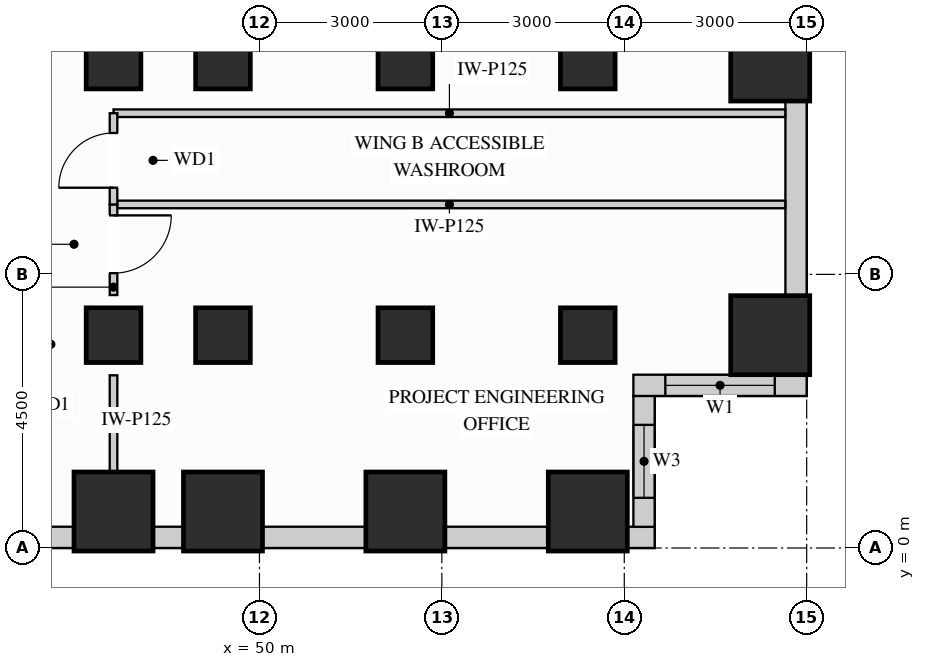
"""IFC4 building model, lengths in metres.
Left out: names, types, materials, properties, quantities, classifications, styles, units other than length and angle.
Written with IfcOpenShell. Run it as: python <this file> out.ifc"""

import sys

from ifc_helpers import new_model, si_unit, direction, frame, frame_2d, origin, origin_2d, place, context, subcontext, project, spatial, rectangle, extrude, source, transform, mapped, element, fill, save


model = new_model("IFC4")
c1 = context("Model", 3, precision=1e-05, world=origin(), true_north=direction((0.0, 1.0)))
c2 = subcontext(c1, "Body", "Model", "MODEL_VIEW")
j1 = project(units=[si_unit("LENGTHUNIT", "METRE"), si_unit("PLANEANGLEUNIT", "RADIAN")], contexts=[c1])
p1 = place(None, origin())
s1 = spatial("IfcSite", under=j1, at=p1, CompositionType="ELEMENT")
p2 = place(p1, origin())
s2 = spatial("IfcBuilding", under=s1, at=p2, CompositionType="ELEMENT")
p3 = place(p2, frame((0.0, 0.0, 44.1)))
s3 = spatial("IfcBuildingStorey", under=s2, at=p3, CompositionType="ELEMENT", Elevation=44.1)
m1 = source(origin(), c2, "Body", "SweptSolid", [
    extrude(rectangle(XDim=0.9, YDim=0.9, at=origin_2d()), origin(), (0.0, 0.0, 1.0), 3.38),
])
for number, where, z_axis, x_axis in (
    (1, (47.6, 3.5, 0.0), (0.0, 0.0, 1.0), (1.0, 0.0, 0.0)),
    (2, (47.6, 8.0, 0.0), (0.0, 0.0, 1.0), (1.0, 0.0, 0.0)),
    (3, (49.4, 3.5, 0.0), (0.0, 0.0, 1.0), (1.0, 0.0, 0.0)),
    (4, (49.4, 8.0, 0.0), (0.0, 0.0, 1.0), (1.0, 0.0, 0.0)),
    (5, (52.4, 3.5, 0.0), (0.0, 0.0, 1.0), (1.0, 0.0, 0.0)),
    (6, (52.4, 8.0, 0.0), (0.0, 0.0, 1.0), (1.0, 0.0, 0.0)),
    (7, (55.4, 3.5, 0.0), (0.0, 0.0, 1.0), (1.0, 0.0, 0.0)),
    (8, (55.4, 8.0, 0.0), (0.0, 0.0, 1.0), (1.0, 0.0, 0.0)),
):
    element("IfcColumn", number, at=place(p3, frame(where, z_axis=z_axis, x_axis=x_axis)), inside=s3, PredefinedType="COLUMN", context=c2, shape_type="MappedRepresentation", body=[
        mapped(m1, transform((0.0, 0.0, 0.0), x_axis=(1.0, 0.0, 0.0), y_axis=(0.0, 1.0, 0.0), z_axis=(0.0, 0.0, 1.0))),
    ])
m2 = source(origin(), c2, "Body", "SweptSolid", [
    extrude(rectangle(XDim=1.3, YDim=1.3, at=origin_2d()), origin(), (0.0, 0.0, 1.0), 3.38),
])
for number, where, z_axis, x_axis in (
    (9, (58.4, 3.5, 0.0), (0.0, 0.0, 1.0), (1.0, 0.0, 0.0)),
    (10, (58.4, 8.0, 0.0), (0.0, 0.0, 1.0), (1.0, 0.0, 0.0)),
    (11, (47.6, 0.6, 0.0), (0.0, 0.0, 1.0), (1.0, 0.0, 0.0)),
    (12, (49.4, 0.6, 0.0), (0.0, 0.0, 1.0), (1.0, 0.0, 0.0)),
    (13, (52.4, 0.6, 0.0), (0.0, 0.0, 1.0), (1.0, 0.0, 0.0)),
    (14, (55.4, 0.6, 0.0), (0.0, 0.0, 1.0), (1.0, 0.0, 0.0)),
):
    element("IfcColumn", number, at=place(p3, frame(where, z_axis=z_axis, x_axis=x_axis)), inside=s3, PredefinedType="COLUMN", context=c2, shape_type="MappedRepresentation", body=[
        mapped(m2, transform((0.0, 0.0, 0.0), x_axis=(1.0, 0.0, 0.0), y_axis=(0.0, 1.0, 0.0), z_axis=(0.0, 0.0, 1.0))),
    ])
p4 = place(p3, frame((40.648, 0.175, 0.0), z_axis=(0.0, 0.0, 1.0), x_axis=(1.0, 0.0, 0.0)))
e15 = element("IfcWall", 15, at=p4, inside=s3, PredefinedType="SOLIDWALL", context=c2, shape_type="SweptSolid", body=[
    extrude(rectangle(XDim=6.304, YDim=0.35, at=frame_2d((3.152, 0.0))), origin(), (0.0, 0.0, 1.0), 2.428),
])
p5 = place(p4, frame((0.687, 0.0, 0.78)))
e16 = element("IfcOpeningElement", 16, at=p5, cuts=e15, PredefinedType="OPENING", context=c2, shape_type="SweptSolid", body=[
    extrude(rectangle(XDim=1.8, YDim=1.468, at=frame_2d((0.9, 0.734))), frame((0.0, 0.185, 0.0), z_axis=(0.0, -1.0, 0.0), x_axis=(1.0, 0.0, 0.0)), (0.0, 0.0, 1.0), 0.37),
])
p6 = place(p4, frame((2.855, 0.0, 0.78)))
e17 = element("IfcOpeningElement", 17, at=p6, cuts=e15, PredefinedType="OPENING", context=c2, shape_type="SweptSolid", body=[
    extrude(rectangle(XDim=1.8, YDim=1.468, at=frame_2d((0.9, 0.734))), frame((0.0, 0.185, 0.0), z_axis=(0.0, -1.0, 0.0), x_axis=(1.0, 0.0, 0.0)), (0.0, 0.0, 1.0), 0.37),
])
m3 = source(origin(), c2, "Body", "SweptSolid", [
    extrude(rectangle(XDim=0.504, YDim=0.35, at=frame_2d((0.252, 0.0))), origin(), (0.0, 0.0, 1.0), 3.365),
])
p7 = place(p3, frame((48.248, 0.175, 0.0), z_axis=(0.0, 0.0, 1.0), x_axis=(1.0, 0.0, 0.0)))
e18 = element("IfcWall", 18, at=p7, inside=s3, PredefinedType="SOLIDWALL", context=c2, shape_type="MappedRepresentation", body=[
    mapped(m3, transform((0.0, 0.0, 0.0), x_axis=(1.0, 0.0, 0.0), y_axis=(0.0, 1.0, 0.0), z_axis=(0.0, 0.0, 1.0))),
])
m4 = source(origin(), c2, "Body", "SweptSolid", [
    extrude(rectangle(XDim=1.704, YDim=0.35, at=frame_2d((0.852, 0.0))), origin(), (0.0, 0.0, 1.0), 2.51),
])
for number, where, z_axis, x_axis in (
    (19, (50.048, 0.175, 0.0), (0.0, 0.0, 1.0), (1.0, 0.0, 0.0)),
    (20, (53.048, 0.175, 0.0), (0.0, 0.0, 1.0), (1.0, 0.0, 0.0)),
):
    element("IfcWall", number, at=place(p3, frame(where, z_axis=z_axis, x_axis=x_axis)), inside=s3, PredefinedType="SOLIDWALL", context=c2, shape_type="MappedRepresentation", body=[
        mapped(m4, transform((0.0, 0.0, 0.0), x_axis=(1.0, 0.0, 0.0), y_axis=(0.0, 1.0, 0.0), z_axis=(0.0, 0.0, 1.0))),
    ])
m5 = source(origin(), c2, "Body", "SweptSolid", [
    extrude(rectangle(XDim=0.452, YDim=0.35, at=frame_2d((0.226, 0.0))), origin(), (0.0, 0.0, 1.0), 3.365),
])
p8 = place(p3, frame((56.048, 0.175, 0.0), z_axis=(0.0, 0.0, 1.0), x_axis=(1.0, 0.0, 0.0)))
e21 = element("IfcWall", 21, at=p8, inside=s3, PredefinedType="SOLIDWALL", context=c2, shape_type="MappedRepresentation", body=[
    mapped(m5, transform((0.0, 0.0, 0.0), x_axis=(1.0, 0.0, 0.0), y_axis=(0.0, 1.0, 0.0), z_axis=(0.0, 0.0, 1.0))),
])
p9 = place(p3, frame((56.325, 0.348, 0.0), z_axis=(0.0, 0.0, 1.0), x_axis=(0.0, 1.0, 0.0)))
e22 = element("IfcWall", 22, at=p9, inside=s3, PredefinedType="SOLIDWALL", context=c2, shape_type="SweptSolid", body=[
    extrude(rectangle(XDim=2.154, YDim=0.35, at=frame_2d((1.077, 0.0))), origin(), (0.0, 0.0, 1.0), 3.365),
])
p10 = place(p9, frame((0.477, 0.0, 0.78)))
e23 = element("IfcOpeningElement", 23, at=p10, cuts=e22, PredefinedType="OPENING", context=c2, shape_type="SweptSolid", body=[
    extrude(rectangle(XDim=1.2, YDim=2.1, at=frame_2d((0.6, 1.05))), frame((0.0, 0.185, 0.0), z_axis=(0.0, -1.0, 0.0), x_axis=(1.0, 0.0, 0.0)), (0.0, 0.0, 1.0), 0.37),
])
p11 = place(p3, frame((56.15, 2.675, 0.0), z_axis=(0.0, 0.0, 1.0), x_axis=(1.0, 0.0, 0.0)))
e24 = element("IfcWall", 24, at=p11, inside=s3, PredefinedType="SOLIDWALL", context=c2, shape_type="SweptSolid", body=[
    extrude(rectangle(XDim=2.85, YDim=0.35, at=frame_2d((1.425, 0.0))), origin(), (0.0, 0.0, 1.0), 3.365),
])
p12 = place(p11, frame((0.525, 0.0, 0.78)))
e25 = element("IfcOpeningElement", 25, at=p12, cuts=e24, PredefinedType="OPENING", context=c2, shape_type="SweptSolid", body=[
    extrude(rectangle(XDim=1.8, YDim=2.1, at=frame_2d((0.9, 1.05))), frame((0.0, 0.185, 0.0), z_axis=(0.0, -1.0, 0.0), x_axis=(1.0, 0.0, 0.0)), (0.0, 0.0, 1.0), 0.37),
])
m6 = source(origin(), c2, "Body", "SweptSolid", [
    extrude(rectangle(XDim=3.204, YDim=0.35, at=frame_2d((1.602, 0.0))), origin(), (0.0, 0.0, 1.0), 2.51),
])
p13 = place(p3, frame((58.825, 4.148, 0.0), z_axis=(0.0, 0.0, 1.0), x_axis=(0.0, 1.0, 0.0)))
e26 = element("IfcWall", 26, at=p13, inside=s3, PredefinedType="SOLIDWALL", context=c2, shape_type="MappedRepresentation", body=[
    mapped(m6, transform((0.0, 0.0, 0.0), x_axis=(1.0, 0.0, 0.0), y_axis=(0.0, 1.0, 0.0), z_axis=(0.0, 0.0, 1.0))),
])
m7 = source(origin(), c2, "Body", "SweptSolid", [
    extrude(rectangle(XDim=11.048, YDim=0.125, at=frame_2d((5.524, 0.0))), origin(), (0.0, 0.0, 1.0), 3.365),
])
for number, where, z_axis, x_axis in (
    (27, (47.6, 5.65, 0.0), (0.0, 0.0, 1.0), (1.0, 0.0, 0.0)),
    (28, (47.6, 7.15, 0.0), (0.0, 0.0, 1.0), (1.0, 0.0, 0.0)),
):
    element("IfcWall", number, at=place(p3, frame(where, z_axis=z_axis, x_axis=x_axis)), inside=s3, PredefinedType="PARTITIONING", context=c2, shape_type="MappedRepresentation", body=[
        mapped(m7, transform((0.0, 0.0, 0.0), x_axis=(1.0, 0.0, 0.0), y_axis=(0.0, 1.0, 0.0), z_axis=(0.0, 0.0, 1.0))),
    ])
p14 = place(p3, frame((47.6, 4.16, 0.0), z_axis=(0.0, 0.0, 1.0), x_axis=(0.0, 1.0, 0.0)))
e29 = element("IfcWall", 29, at=p14, inside=s3, PredefinedType="PARTITIONING", context=c2, shape_type="SweptSolid", body=[
    extrude(rectangle(XDim=1.49, YDim=0.125, at=frame_2d((0.745, 0.0))), origin(), (0.0, 0.0, 1.0), 2.67),
])
p15 = place(p14, frame((0.36, 0.0, 0.0)))
e30 = element("IfcOpeningElement", 30, at=p15, cuts=e29, PredefinedType="OPENING", context=c2, shape_type="SweptSolid", body=[
    extrude(rectangle(XDim=0.95, YDim=2.15, at=frame_2d((0.475, 1.075))), frame((0.0, 0.073, 0.0), z_axis=(0.0, -1.0, 0.0), x_axis=(1.0, 0.0, 0.0)), (0.0, 0.0, 1.0), 0.145),
])
m8 = source(origin(), c2, "Body", "SweptSolid", [
    extrude(rectangle(XDim=1.58, YDim=0.125, at=frame_2d((0.79, 0.0))), origin(), (0.0, 0.0, 1.0), 2.67),
])
p16 = place(p3, frame((47.6, 1.26, 0.0), z_axis=(0.0, 0.0, 1.0), x_axis=(0.0, 1.0, 0.0)))
e31 = element("IfcWall", 31, at=p16, inside=s3, PredefinedType="PARTITIONING", context=c2, shape_type="MappedRepresentation", body=[
    mapped(m8, transform((0.0, 0.0, 0.0), x_axis=(1.0, 0.0, 0.0), y_axis=(0.0, 1.0, 0.0), z_axis=(0.0, 0.0, 1.0))),
])
p17 = place(p3, frame((47.6, 5.65, 0.0), z_axis=(0.0, 0.0, 1.0), x_axis=(0.0, 1.0, 0.0)))
e32 = element("IfcWall", 32, at=p17, inside=s3, PredefinedType="PARTITIONING", context=c2, shape_type="SweptSolid", body=[
    extrude(rectangle(XDim=1.5, YDim=0.125, at=frame_2d((0.75, 0.0))), origin(), (0.0, 0.0, 1.0), 2.67),
])
p18 = place(p17, frame((0.275, 0.0, 0.0)))
e33 = element("IfcOpeningElement", 33, at=p18, cuts=e32, PredefinedType="OPENING", context=c2, shape_type="SweptSolid", body=[
    extrude(rectangle(XDim=0.9, YDim=2.15, at=frame_2d((0.45, 1.075))), frame((0.0, 0.073, 0.0), z_axis=(0.0, -1.0, 0.0), x_axis=(1.0, 0.0, 0.0)), (0.0, 0.0, 1.0), 0.145),
])
m9 = source(origin(), c2, "Body", "SweptSolid", [
    extrude(rectangle(XDim=0.95, YDim=2.15, at=frame_2d((0.475, 1.075))), frame((0.0, 0.025, 0.0), z_axis=(0.0, -1.0, 0.0), x_axis=(1.0, 0.0, 0.0)), (0.0, 0.0, 1.0), 0.05),
])
p19 = place(p15, origin())
e34 = element("IfcDoor", 34, at=p19, inside=s3, OperationType="SINGLE_SWING_RIGHT", PredefinedType="DOOR", context=c2, shape_type="MappedRepresentation", body=[
    mapped(m9, transform((0.0, 0.0, 0.0), x_axis=(1.0, 0.0, 0.0), y_axis=(0.0, 1.0, 0.0), z_axis=(0.0, 0.0, 1.0))),
])
fill(e30, e34)
m10 = source(origin(), c2, "Body", "SweptSolid", [
    extrude(rectangle(XDim=0.9, YDim=2.15, at=frame_2d((0.45, 1.075))), frame((0.0, 0.025, 0.0), z_axis=(0.0, -1.0, 0.0), x_axis=(1.0, 0.0, 0.0)), (0.0, 0.0, 1.0), 0.05),
])
p20 = place(p18, origin())
e35 = element("IfcDoor", 35, at=p20, inside=s3, OperationType="SINGLE_SWING_LEFT", PredefinedType="DOOR", context=c2, shape_type="MappedRepresentation", body=[
    mapped(m10, transform((0.0, 0.0, 0.0), x_axis=(1.0, 0.0, 0.0), y_axis=(0.0, 1.0, 0.0), z_axis=(0.0, 0.0, 1.0))),
])
fill(e33, e35)
m11 = source(origin(), c2, "Body", "SweptSolid", [
    extrude(rectangle(XDim=1.8, YDim=2.1, at=frame_2d((0.9, 1.05))), frame((0.0, 0.03, 0.0), z_axis=(0.0, -1.0, 0.0), x_axis=(1.0, 0.0, 0.0)), (0.0, 0.0, 1.0), 0.06),
])
p21 = place(p12, origin())
e36 = element("IfcWindow", 36, at=p21, inside=s3, PartitioningType="SINGLE_PANEL", PredefinedType="WINDOW", context=c2, shape_type="MappedRepresentation", body=[
    mapped(m11, transform((0.0, 0.0, 0.0), x_axis=(1.0, 0.0, 0.0), y_axis=(0.0, 1.0, 0.0), z_axis=(0.0, 0.0, 1.0))),
])
fill(e25, e36)
m12 = source(origin(), c2, "Body", "SweptSolid", [
    extrude(rectangle(XDim=1.2, YDim=2.1, at=frame_2d((0.6, 1.05))), frame((0.0, 0.03, 0.0), z_axis=(0.0, -1.0, 0.0), x_axis=(1.0, 0.0, 0.0)), (0.0, 0.0, 1.0), 0.06),
])
p22 = place(p10, origin())
e37 = element("IfcWindow", 37, at=p22, inside=s3, PartitioningType="SINGLE_PANEL", PredefinedType="WINDOW", context=c2, shape_type="MappedRepresentation", body=[
    mapped(m12, transform((0.0, 0.0, 0.0), x_axis=(1.0, 0.0, 0.0), y_axis=(0.0, 1.0, 0.0), z_axis=(0.0, 0.0, 1.0))),
])
fill(e23, e37)
save(model, sys.argv[1])
